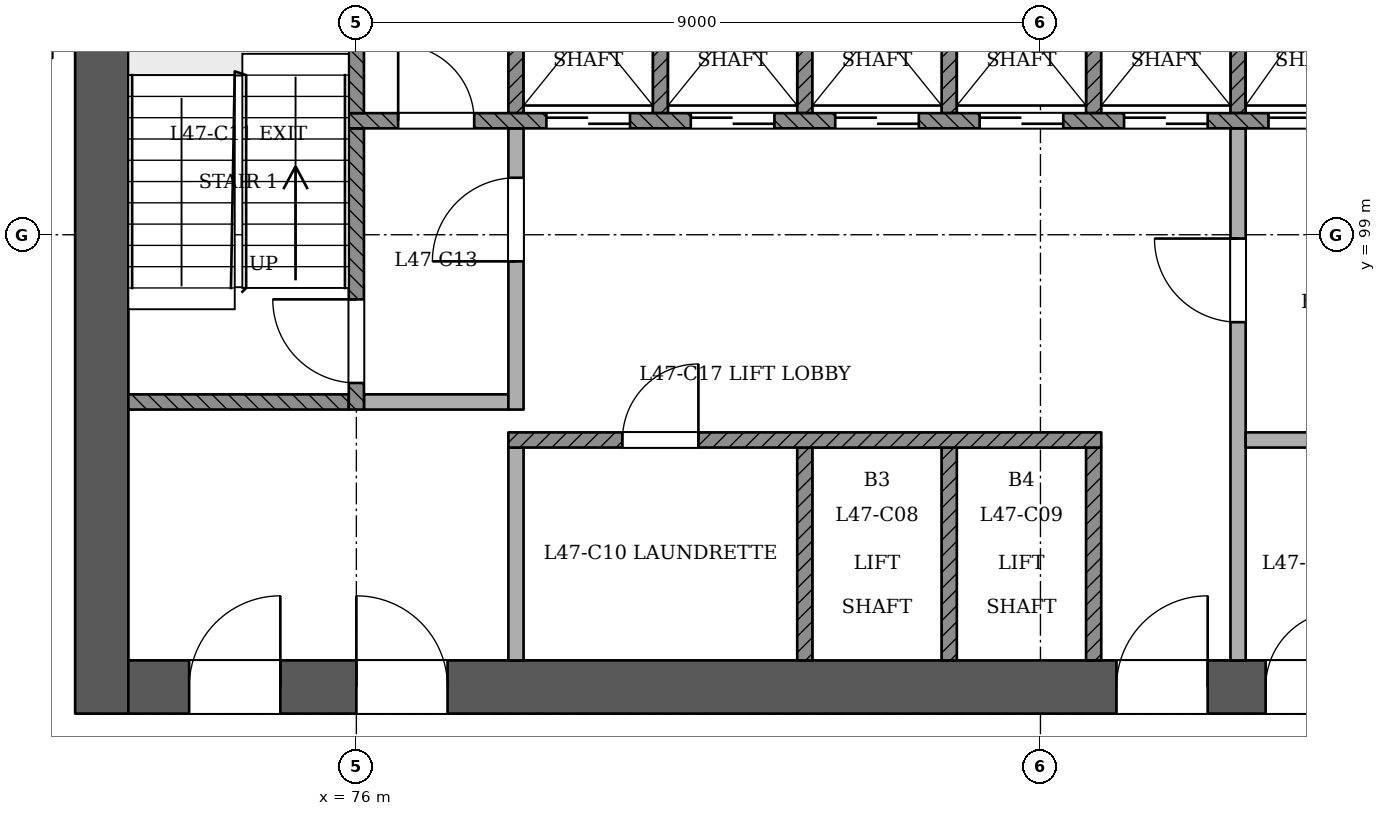
"""IFC4 building model, lengths in metres.
Left out: names, types, materials, properties, quantities, classifications, styles, units other than length and angle.
Written with IfcOpenShell. Run it as: python <this file> out.ifc"""

import sys

from ifc_helpers import new_model, si_unit, direction, frame, frame_2d, origin, place, context, subcontext, project, spatial, rectangle, extrude, element, fill, save


model = new_model("IFC4")
c1 = context("Model", 3, precision=1e-05, world=origin(), true_north=direction((0.0, 1.0)))
c2 = subcontext(c1, "Body", "Model", "MODEL_VIEW")
j1 = project(units=[si_unit("LENGTHUNIT", "METRE"), si_unit("PLANEANGLEUNIT", "RADIAN")], contexts=[c1])
p1 = place(None, origin())
s1 = spatial("IfcSite", under=j1, at=p1, CompositionType="ELEMENT")
p2 = place(p1, origin())
s2 = spatial("IfcBuilding", under=s1, at=p2, CompositionType="ELEMENT")
p3 = place(p2, frame((0.0, 0.0, 181.8)))
s3 = spatial("IfcBuildingStorey", under=s2, at=p3, CompositionType="ELEMENT", Elevation=181.8)
p4 = place(p3, frame((72.65, 93.05, 0.0), z_axis=(0.0, 0.0, 1.0), x_axis=(1.0, 0.0, 0.0)))
e1 = element("IfcWall", 1, at=p4, inside=s3, PredefinedType="SHEAR", context=c2, shape_type="SweptSolid", body=[
    extrude(rectangle(XDim=25.05, YDim=0.7, at=frame_2d((12.525, 0.0))), origin(), (0.0, 0.0, 1.0), 3.6),
])
p5 = place(p4, frame((1.15, 0.0, 0.0)))
e2 = element("IfcOpeningElement", 2, at=p5, cuts=e1, PredefinedType="OPENING", context=c2, shape_type="SweptSolid", body=[
    extrude(rectangle(XDim=1.2, YDim=2.1, at=frame_2d((0.6, 1.05))), frame((0.0, 0.36, 0.0), z_axis=(0.0, -1.0, 0.0), x_axis=(1.0, 0.0, 0.0)), (0.0, 0.0, 1.0), 0.721),
])
p6 = place(p4, frame((3.35, 0.0, 0.0)))
e3 = element("IfcOpeningElement", 3, at=p6, cuts=e1, PredefinedType="OPENING", context=c2, shape_type="SweptSolid", body=[
    extrude(rectangle(XDim=1.2, YDim=2.1, at=frame_2d((0.6, 1.05))), frame((0.0, 0.36, 0.0), z_axis=(0.0, -1.0, 0.0), x_axis=(1.0, 0.0, 0.0)), (0.0, 0.0, 1.0), 0.721),
])
p7 = place(p4, frame((13.35, 0.0, 0.0)))
e4 = element("IfcOpeningElement", 4, at=p7, cuts=e1, PredefinedType="OPENING", context=c2, shape_type="SweptSolid", body=[
    extrude(rectangle(XDim=1.2, YDim=2.1, at=frame_2d((0.6, 1.05))), frame((0.0, 0.36, 0.0), z_axis=(0.0, -1.0, 0.0), x_axis=(1.0, 0.0, 0.0)), (0.0, 0.0, 1.0), 0.721),
])
p8 = place(p4, frame((15.312, 0.0, 0.0)))
e5 = element("IfcOpeningElement", 5, at=p8, cuts=e1, PredefinedType="OPENING", context=c2, shape_type="SweptSolid", body=[
    extrude(rectangle(XDim=1.0, YDim=2.1, at=frame_2d((0.5, 1.05))), frame((0.0, 0.36, 0.0), z_axis=(0.0, -1.0, 0.0), x_axis=(1.0, 0.0, 0.0)), (0.0, 0.0, 1.0), 0.721),
])
p9 = place(p4, frame((18.15, 0.0, 0.0)))
e6 = element("IfcOpeningElement", 6, at=p9, cuts=e1, PredefinedType="OPENING", context=c2, shape_type="SweptSolid", body=[
    extrude(rectangle(XDim=1.0, YDim=2.1, at=frame_2d((0.5, 1.05))), frame((0.0, 0.36, 0.0), z_axis=(0.0, -1.0, 0.0), x_axis=(1.0, 0.0, 0.0)), (0.0, 0.0, 1.0), 0.721),
])
p10 = place(p4, frame((21.05, 0.0, 0.0)))
e7 = element("IfcOpeningElement", 7, at=p10, cuts=e1, PredefinedType="OPENING", context=c2, shape_type="SweptSolid", body=[
    extrude(rectangle(XDim=1.0, YDim=2.1, at=frame_2d((0.5, 1.05))), frame((0.0, 0.36, 0.0), z_axis=(0.0, -1.0, 0.0), x_axis=(1.0, 0.0, 0.0)), (0.0, 0.0, 1.0), 0.721),
])
p11 = place(p4, frame((22.938, 0.0, 0.0)))
e8 = element("IfcOpeningElement", 8, at=p11, cuts=e1, PredefinedType="OPENING", context=c2, shape_type="SweptSolid", body=[
    extrude(rectangle(XDim=1.0, YDim=2.1, at=frame_2d((0.5, 1.05))), frame((0.0, 0.36, 0.0), z_axis=(0.0, -1.0, 0.0), x_axis=(1.0, 0.0, 0.0)), (0.0, 0.0, 1.0), 0.721),
])
p12 = place(p3, frame((72.65, 103.75, 0.0), z_axis=(0.0, 0.0, 1.0), x_axis=(0.0, -1.0, 0.0)))
e9 = element("IfcWall", 9, at=p12, inside=s3, PredefinedType="SHEAR", context=c2, shape_type="SweptSolid", body=[
    extrude(rectangle(XDim=11.05, YDim=0.7, at=frame_2d((5.525, 0.0))), origin(), (0.0, 0.0, 1.0), 3.6),
])
p13 = place(p3, frame((78.1, 93.4, 0.0), z_axis=(0.0, 0.0, 1.0), x_axis=(0.0, 1.0, 0.0)))
e10 = element("IfcWall", 10, at=p13, inside=s3, PredefinedType="PARTITIONING", context=c2, shape_type="SweptSolid", body=[
    extrude(rectangle(XDim=2.8, YDim=0.2, at=frame_2d((1.4, 0.0))), origin(), (0.0, 0.0, 1.0), 3.15),
])
for number, where, z_axis, x_axis in (
    (11, (81.9, 93.4, 0.0), (0.0, 0.0, 1.0), (0.0, 1.0, 0.0)),
    (12, (83.8, 93.4, 0.0), (0.0, 0.0, 1.0), (0.0, 1.0, 0.0)),
    (13, (85.7, 93.4, 0.0), (0.0, 0.0, 1.0), (0.0, 1.0, 0.0)),
):
    element("IfcWall", number, at=place(p3, frame(where, z_axis=z_axis, x_axis=x_axis)), inside=s3, PredefinedType="SOLIDWALL", context=c2, shape_type="SweptSolid", body=[
        extrude(rectangle(XDim=2.8, YDim=0.2, at=frame_2d((1.4, 0.0))), origin(), (0.0, 0.0, 1.0), 3.15),
    ])
p14 = place(p3, frame((87.6, 93.4, 0.0), z_axis=(0.0, 0.0, 1.0), x_axis=(0.0, 1.0, 0.0)))
e14 = element("IfcWall", 14, at=p14, inside=s3, PredefinedType="PARTITIONING", context=c2, shape_type="SweptSolid", body=[
    extrude(rectangle(XDim=7.0, YDim=0.2, at=frame_2d((3.5, 0.0))), origin(), (0.0, 0.0, 1.0), 3.15),
])
p15 = place(p14, frame((4.45, 0.0, 0.0)))
e15 = element("IfcOpeningElement", 15, at=p15, cuts=e14, PredefinedType="OPENING", context=c2, shape_type="SweptSolid", body=[
    extrude(rectangle(XDim=1.1, YDim=2.1, at=frame_2d((0.55, 1.05))), frame((0.0, 0.11, 0.0), z_axis=(0.0, -1.0, 0.0), x_axis=(1.0, 0.0, 0.0)), (0.0, 0.0, 1.0), 0.221),
])
p16 = place(p3, frame((78.0, 96.3, 0.0), z_axis=(0.0, 0.0, 1.0), x_axis=(1.0, 0.0, 0.0)))
e16 = element("IfcWall", 16, at=p16, inside=s3, PredefinedType="SOLIDWALL", context=c2, shape_type="SweptSolid", body=[
    extrude(rectangle(XDim=7.8, YDim=0.2, at=frame_2d((3.9, 0.0))), origin(), (0.0, 0.0, 1.0), 3.15),
])
p17 = place(p16, frame((1.5, 0.0, 0.0)))
e17 = element("IfcOpeningElement", 17, at=p17, cuts=e16, PredefinedType="OPENING", context=c2, shape_type="SweptSolid", body=[
    extrude(rectangle(XDim=1.0, YDim=2.1, at=frame_2d((0.5, 1.05))), frame((0.0, 0.11, 0.0), z_axis=(0.0, -1.0, 0.0), x_axis=(1.0, 0.0, 0.0)), (0.0, 0.0, 1.0), 0.221),
])
p18 = place(p3, frame((87.7, 96.3, 0.0), z_axis=(0.0, 0.0, 1.0), x_axis=(1.0, 0.0, 0.0)))
e18 = element("IfcWall", 18, at=p18, inside=s3, PredefinedType="PARTITIONING", context=c2, shape_type="SweptSolid", body=[
    extrude(rectangle(XDim=3.6, YDim=0.2, at=frame_2d((1.8, 0.0))), origin(), (0.0, 0.0, 1.0), 3.15),
])
p19 = place(p3, frame((73.0, 96.8, 0.0), z_axis=(0.0, 0.0, 1.0), x_axis=(1.0, 0.0, 0.0)))
e19 = element("IfcWall", 19, at=p19, inside=s3, PredefinedType="SOLIDWALL", context=c2, shape_type="SweptSolid", body=[
    extrude(rectangle(XDim=2.9, YDim=0.2, at=frame_2d((1.45, 0.0))), origin(), (0.0, 0.0, 1.0), 3.15),
])
p20 = place(p3, frame((76.0, 96.7, 0.0), z_axis=(0.0, 0.0, 1.0), x_axis=(0.0, 1.0, 0.0)))
e20 = element("IfcWall", 20, at=p20, inside=s3, PredefinedType="SOLIDWALL", context=c2, shape_type="SweptSolid", body=[
    extrude(rectangle(XDim=3.7, YDim=0.2, at=frame_2d((1.85, 0.0))), origin(), (0.0, 0.0, 1.0), 3.15),
])
p21 = place(p20, frame((0.35, 0.0, 0.0)))
e21 = element("IfcOpeningElement", 21, at=p21, cuts=e20, PredefinedType="OPENING", context=c2, shape_type="SweptSolid", body=[
    extrude(rectangle(XDim=1.1, YDim=2.1, at=frame_2d((0.55, 1.05))), frame((0.0, 0.11, 0.0), z_axis=(0.0, -1.0, 0.0), x_axis=(1.0, 0.0, 0.0)), (0.0, 0.0, 1.0), 0.221),
])
p22 = place(p3, frame((76.1, 96.8, 0.0), z_axis=(0.0, 0.0, 1.0), x_axis=(1.0, 0.0, 0.0)))
e22 = element("IfcWall", 22, at=p22, inside=s3, PredefinedType="PARTITIONING", context=c2, shape_type="SweptSolid", body=[
    extrude(rectangle(XDim=1.9, YDim=0.2, at=frame_2d((0.95, 0.0))), origin(), (0.0, 0.0, 1.0), 3.15),
])
p23 = place(p3, frame((78.1, 96.7, 0.0), z_axis=(0.0, 0.0, 1.0), x_axis=(0.0, 1.0, 0.0)))
e23 = element("IfcWall", 23, at=p23, inside=s3, PredefinedType="PARTITIONING", context=c2, shape_type="SweptSolid", body=[
    extrude(rectangle(XDim=3.7, YDim=0.2, at=frame_2d((1.85, 0.0))), origin(), (0.0, 0.0, 1.0), 3.15),
])
p24 = place(p23, frame((1.95, 0.0, 0.0)))
e24 = element("IfcOpeningElement", 24, at=p24, cuts=e23, PredefinedType="OPENING", context=c2, shape_type="SweptSolid", body=[
    extrude(rectangle(XDim=1.1, YDim=2.1, at=frame_2d((0.55, 1.05))), frame((0.0, 0.11, 0.0), z_axis=(0.0, -1.0, 0.0), x_axis=(1.0, 0.0, 0.0)), (0.0, 0.0, 1.0), 0.221),
])
p25 = place(p3, frame((75.9, 100.5, 0.0), z_axis=(0.0, 0.0, 1.0), x_axis=(1.0, 0.0, 0.0)))
e25 = element("IfcWall", 25, at=p25, inside=s3, PredefinedType="SOLIDWALL", context=c2, shape_type="SweptSolid", body=[
    extrude(rectangle(XDim=18.2, YDim=0.2, at=frame_2d((9.1, 0.0))), origin(), (0.0, 0.0, 1.0), 3.15),
])
p26 = place(p25, frame((2.6, 0.0, 0.0)))
e26 = element("IfcOpeningElement", 26, at=p26, cuts=e25, PredefinedType="OPENING", context=c2, shape_type="SweptSolid", body=[
    extrude(rectangle(XDim=1.1, YDim=2.1, at=frame_2d((0.55, 1.05))), frame((0.0, 0.11, 0.0), z_axis=(0.0, -1.0, 0.0), x_axis=(1.0, 0.0, 0.0)), (0.0, 0.0, 1.0), 0.221),
])
p27 = place(p25, frame((4.5, 0.0, 0.0)))
e27 = element("IfcOpeningElement", 27, at=p27, cuts=e25, PredefinedType="OPENING", context=c2, shape_type="SweptSolid", body=[
    extrude(rectangle(XDim=1.1, YDim=2.1, at=frame_2d((0.55, 1.05))), frame((0.0, 0.11, 0.0), z_axis=(0.0, -1.0, 0.0), x_axis=(1.0, 0.0, 0.0)), (0.0, 0.0, 1.0), 0.221),
])
p28 = place(p25, frame((6.4, 0.0, 0.0)))
e28 = element("IfcOpeningElement", 28, at=p28, cuts=e25, PredefinedType="OPENING", context=c2, shape_type="SweptSolid", body=[
    extrude(rectangle(XDim=1.1, YDim=2.1, at=frame_2d((0.55, 1.05))), frame((0.0, 0.11, 0.0), z_axis=(0.0, -1.0, 0.0), x_axis=(1.0, 0.0, 0.0)), (0.0, 0.0, 1.0), 0.221),
])
p29 = place(p25, frame((8.3, 0.0, 0.0)))
e29 = element("IfcOpeningElement", 29, at=p29, cuts=e25, PredefinedType="OPENING", context=c2, shape_type="SweptSolid", body=[
    extrude(rectangle(XDim=1.1, YDim=2.1, at=frame_2d((0.55, 1.05))), frame((0.0, 0.11, 0.0), z_axis=(0.0, -1.0, 0.0), x_axis=(1.0, 0.0, 0.0)), (0.0, 0.0, 1.0), 0.221),
])
p30 = place(p25, frame((10.2, 0.0, 0.0)))
e30 = element("IfcOpeningElement", 30, at=p30, cuts=e25, PredefinedType="OPENING", context=c2, shape_type="SweptSolid", body=[
    extrude(rectangle(XDim=1.1, YDim=2.1, at=frame_2d((0.55, 1.05))), frame((0.0, 0.11, 0.0), z_axis=(0.0, -1.0, 0.0), x_axis=(1.0, 0.0, 0.0)), (0.0, 0.0, 1.0), 0.221),
])
p31 = place(p25, frame((12.1, 0.0, 0.0)))
e31 = element("IfcOpeningElement", 31, at=p31, cuts=e25, PredefinedType="OPENING", context=c2, shape_type="SweptSolid", body=[
    extrude(rectangle(XDim=1.1, YDim=2.1, at=frame_2d((0.55, 1.05))), frame((0.0, 0.11, 0.0), z_axis=(0.0, -1.0, 0.0), x_axis=(1.0, 0.0, 0.0)), (0.0, 0.0, 1.0), 0.221),
])
p32 = place(p25, frame((14.0, 0.0, 0.0)))
e32 = element("IfcOpeningElement", 32, at=p32, cuts=e25, PredefinedType="OPENING", context=c2, shape_type="SweptSolid", body=[
    extrude(rectangle(XDim=1.1, YDim=2.1, at=frame_2d((0.55, 1.05))), frame((0.0, 0.11, 0.0), z_axis=(0.0, -1.0, 0.0), x_axis=(1.0, 0.0, 0.0)), (0.0, 0.0, 1.0), 0.221),
])
p33 = place(p25, frame((0.65, 0.0, 0.0)))
e33 = element("IfcOpeningElement", 33, at=p33, cuts=e25, PredefinedType="OPENING", context=c2, shape_type="SweptSolid", body=[
    extrude(rectangle(XDim=1.0, YDim=2.1, at=frame_2d((0.5, 1.05))), frame((0.0, 0.11, 0.0), z_axis=(0.0, -1.0, 0.0), x_axis=(1.0, 0.0, 0.0)), (0.0, 0.0, 1.0), 0.221),
])
p34 = place(p25, frame((16.3, 0.0, 0.0)))
e34 = element("IfcOpeningElement", 34, at=p34, cuts=e25, PredefinedType="OPENING", context=c2, shape_type="SweptSolid", body=[
    extrude(rectangle(XDim=1.0, YDim=2.1, at=frame_2d((0.5, 1.05))), frame((0.0, 0.11, 0.0), z_axis=(0.0, -1.0, 0.0), x_axis=(1.0, 0.0, 0.0)), (0.0, 0.0, 1.0), 0.221),
])
for number, where, z_axis, x_axis in (
    (35, (76.0, 100.6, 0.0), (0.0, 0.0, 1.0), (0.0, 1.0, 0.0)),
    (36, (78.1, 100.6, 0.0), (0.0, 0.0, 1.0), (0.0, 1.0, 0.0)),
    (37, (80.0, 100.6, 0.0), (0.0, 0.0, 1.0), (0.0, 1.0, 0.0)),
    (38, (81.9, 100.6, 0.0), (0.0, 0.0, 1.0), (0.0, 1.0, 0.0)),
    (39, (83.8, 100.6, 0.0), (0.0, 0.0, 1.0), (0.0, 1.0, 0.0)),
    (40, (85.7, 100.6, 0.0), (0.0, 0.0, 1.0), (0.0, 1.0, 0.0)),
    (41, (87.6, 100.6, 0.0), (0.0, 0.0, 1.0), (0.0, 1.0, 0.0)),
):
    element("IfcWall", number, at=place(p3, frame(where, z_axis=z_axis, x_axis=x_axis)), inside=s3, PredefinedType="SOLIDWALL", context=c2, shape_type="SweptSolid", body=[
        extrude(rectangle(XDim=2.8, YDim=0.2, at=frame_2d((1.4, 0.0))), origin(), (0.0, 0.0, 1.0), 3.15),
    ])
p35 = place(p26, origin())
e42 = element("IfcDoor", 42, at=p35, inside=s3, OperationType="SLIDING_TO_RIGHT", PredefinedType="NOTDEFINED", context=c2, shape_type="SweptSolid", body=[
    extrude(rectangle(XDim=1.1, YDim=2.1, at=frame_2d((0.55, 1.05))), frame((0.0, 0.025, 0.0), z_axis=(0.0, -1.0, 0.0), x_axis=(1.0, 0.0, 0.0)), (0.0, 0.0, 1.0), 0.05),
])
fill(e26, e42)
p36 = place(p27, origin())
e43 = element("IfcDoor", 43, at=p36, inside=s3, OperationType="SLIDING_TO_LEFT", PredefinedType="NOTDEFINED", context=c2, shape_type="SweptSolid", body=[
    extrude(rectangle(XDim=1.1, YDim=2.1, at=frame_2d((0.55, 1.05))), frame((0.0, 0.025, 0.0), z_axis=(0.0, -1.0, 0.0), x_axis=(1.0, 0.0, 0.0)), (0.0, 0.0, 1.0), 0.05),
])
fill(e27, e43)
p37 = place(p28, origin())
e44 = element("IfcDoor", 44, at=p37, inside=s3, OperationType="SLIDING_TO_RIGHT", PredefinedType="NOTDEFINED", context=c2, shape_type="SweptSolid", body=[
    extrude(rectangle(XDim=1.1, YDim=2.1, at=frame_2d((0.55, 1.05))), frame((0.0, 0.025, 0.0), z_axis=(0.0, -1.0, 0.0), x_axis=(1.0, 0.0, 0.0)), (0.0, 0.0, 1.0), 0.05),
])
fill(e28, e44)
p38 = place(p29, origin())
e45 = element("IfcDoor", 45, at=p38, inside=s3, OperationType="SLIDING_TO_LEFT", PredefinedType="NOTDEFINED", context=c2, shape_type="SweptSolid", body=[
    extrude(rectangle(XDim=1.1, YDim=2.1, at=frame_2d((0.55, 1.05))), frame((0.0, 0.025, 0.0), z_axis=(0.0, -1.0, 0.0), x_axis=(1.0, 0.0, 0.0)), (0.0, 0.0, 1.0), 0.05),
])
fill(e29, e45)
p39 = place(p30, origin())
e46 = element("IfcDoor", 46, at=p39, inside=s3, OperationType="SLIDING_TO_RIGHT", PredefinedType="NOTDEFINED", context=c2, shape_type="SweptSolid", body=[
    extrude(rectangle(XDim=1.1, YDim=2.1, at=frame_2d((0.55, 1.05))), frame((0.0, 0.025, 0.0), z_axis=(0.0, -1.0, 0.0), x_axis=(1.0, 0.0, 0.0)), (0.0, 0.0, 1.0), 0.05),
])
fill(e30, e46)
p40 = place(p31, origin())
e47 = element("IfcDoor", 47, at=p40, inside=s3, OperationType="SLIDING_TO_RIGHT", PredefinedType="NOTDEFINED", context=c2, shape_type="SweptSolid", body=[
    extrude(rectangle(XDim=1.1, YDim=2.1, at=frame_2d((0.55, 1.05))), frame((0.0, 0.025, 0.0), z_axis=(0.0, -1.0, 0.0), x_axis=(1.0, 0.0, 0.0)), (0.0, 0.0, 1.0), 0.05),
])
fill(e31, e47)
p41 = place(p21, origin())
e48 = element("IfcDoor", 48, at=p41, inside=s3, OperationType="SINGLE_SWING_RIGHT", PredefinedType="NOTDEFINED", context=c2, shape_type="SweptSolid", body=[
    extrude(rectangle(XDim=1.1, YDim=2.1, at=frame_2d((0.55, 1.05))), frame((0.0, 0.025, 0.0), z_axis=(0.0, -1.0, 0.0), x_axis=(1.0, 0.0, 0.0)), (0.0, 0.0, 1.0), 0.05),
])
fill(e21, e48)
p42 = place(p24, origin())
e49 = element("IfcDoor", 49, at=p42, inside=s3, OperationType="SINGLE_SWING_LEFT", PredefinedType="NOTDEFINED", context=c2, shape_type="SweptSolid", body=[
    extrude(rectangle(XDim=1.1, YDim=2.1, at=frame_2d((0.55, 1.05))), frame((0.0, 0.025, 0.0), z_axis=(0.0, -1.0, 0.0), x_axis=(1.0, 0.0, 0.0)), (0.0, 0.0, 1.0), 0.05),
])
fill(e24, e49)
p43 = place(p15, origin())
e50 = element("IfcDoor", 50, at=p43, inside=s3, OperationType="SINGLE_SWING_RIGHT", PredefinedType="NOTDEFINED", context=c2, shape_type="SweptSolid", body=[
    extrude(rectangle(XDim=1.1, YDim=2.1, at=frame_2d((0.55, 1.05))), frame((0.0, 0.025, 0.0), z_axis=(0.0, -1.0, 0.0), x_axis=(1.0, 0.0, 0.0)), (0.0, 0.0, 1.0), 0.05),
])
fill(e15, e50)
p44 = place(p5, origin())
e51 = element("IfcDoor", 51, at=p44, inside=s3, OperationType="SINGLE_SWING_RIGHT", PredefinedType="NOTDEFINED", context=c2, shape_type="SweptSolid", body=[
    extrude(rectangle(XDim=1.2, YDim=2.1, at=frame_2d((0.6, 1.05))), frame((0.0, 0.025, 0.0), z_axis=(0.0, -1.0, 0.0), x_axis=(1.0, 0.0, 0.0)), (0.0, 0.0, 1.0), 0.05),
])
fill(e2, e51)
p45 = place(p6, origin())
e52 = element("IfcDoor", 52, at=p45, inside=s3, OperationType="SINGLE_SWING_LEFT", PredefinedType="NOTDEFINED", context=c2, shape_type="SweptSolid", body=[
    extrude(rectangle(XDim=1.2, YDim=2.1, at=frame_2d((0.6, 1.05))), frame((0.0, 0.025, 0.0), z_axis=(0.0, -1.0, 0.0), x_axis=(1.0, 0.0, 0.0)), (0.0, 0.0, 1.0), 0.05),
])
fill(e3, e52)
p46 = place(p7, origin())
e53 = element("IfcDoor", 53, at=p46, inside=s3, OperationType="SINGLE_SWING_RIGHT", PredefinedType="NOTDEFINED", context=c2, shape_type="SweptSolid", body=[
    extrude(rectangle(XDim=1.2, YDim=2.1, at=frame_2d((0.6, 1.05))), frame((0.0, 0.025, 0.0), z_axis=(0.0, -1.0, 0.0), x_axis=(1.0, 0.0, 0.0)), (0.0, 0.0, 1.0), 0.05),
])
fill(e4, e53)
p47 = place(p33, origin())
e54 = element("IfcDoor", 54, at=p47, inside=s3, OperationType="SINGLE_SWING_LEFT", PredefinedType="NOTDEFINED", context=c2, shape_type="SweptSolid", body=[
    extrude(rectangle(XDim=1.0, YDim=2.1, at=frame_2d((0.5, 1.05))), frame((0.0, 0.025, 0.0), z_axis=(0.0, -1.0, 0.0), x_axis=(1.0, 0.0, 0.0)), (0.0, 0.0, 1.0), 0.05),
])
fill(e33, e54)
p48 = place(p8, origin())
e55 = element("IfcDoor", 55, at=p48, inside=s3, OperationType="SINGLE_SWING_RIGHT", PredefinedType="NOTDEFINED", context=c2, shape_type="SweptSolid", body=[
    extrude(rectangle(XDim=1.0, YDim=2.1, at=frame_2d((0.5, 1.05))), frame((0.0, 0.025, 0.0), z_axis=(0.0, -1.0, 0.0), x_axis=(1.0, 0.0, 0.0)), (0.0, 0.0, 1.0), 0.05),
])
fill(e5, e55)
p49 = place(p17, origin())
e56 = element("IfcDoor", 56, at=p49, inside=s3, OperationType="SINGLE_SWING_RIGHT", PredefinedType="NOTDEFINED", context=c2, shape_type="SweptSolid", body=[
    extrude(rectangle(XDim=1.0, YDim=2.1, at=frame_2d((0.5, 1.05))), frame((0.0, 0.025, 0.0), z_axis=(0.0, -1.0, 0.0), x_axis=(1.0, 0.0, 0.0)), (0.0, 0.0, 1.0), 0.05),
])
fill(e17, e56)
save(model, sys.argv[1])
